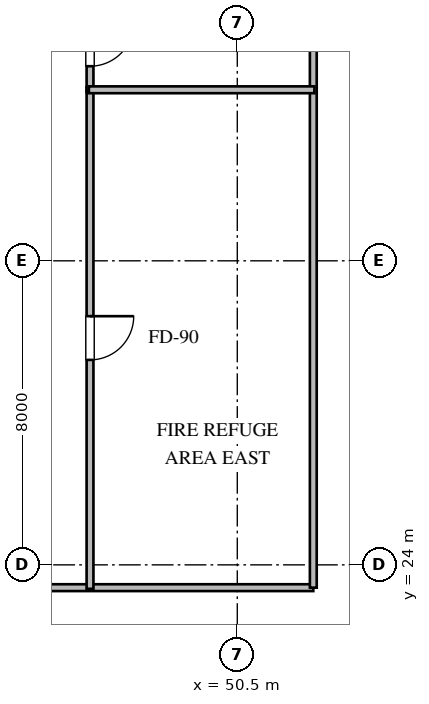
"""IFC4 building model, lengths in metres.
Left out: names, types, materials, properties, quantities, classifications, styles, units other than length and angle.
Written with IfcOpenShell. Run it as: python <this file> out.ifc"""

import sys

from ifc_helpers import new_model, si_unit, direction, frame, frame_2d, origin, place, context, subcontext, project, spatial, rectangle, extrude, element, fill, save


model = new_model("IFC4")
c1 = context("Model", 3, precision=1e-05, world=origin(), true_north=direction((0.0, 1.0)))
c2 = subcontext(c1, "Body", "Model", "MODEL_VIEW")
j1 = project(units=[si_unit("LENGTHUNIT", "METRE"), si_unit("PLANEANGLEUNIT", "RADIAN")], contexts=[c1])
p1 = place(None, origin())
s1 = spatial("IfcSite", under=j1, at=p1, CompositionType="ELEMENT")
p2 = place(p1, origin())
s2 = spatial("IfcBuilding", under=s1, at=p2, CompositionType="ELEMENT")
p3 = place(p2, frame((0.0, 0.0, 253.2)))
s3 = spatial("IfcBuildingStorey", under=s2, at=p3, CompositionType="ELEMENT", Elevation=253.2)
p4 = place(p3, frame((44.225, 23.4, 0.0), z_axis=(0.0, 0.0, 1.0), x_axis=(1.0, 0.0, 0.0)))
e1 = element("IfcWall", 1, at=p4, inside=s3, PredefinedType="PARTITIONING", context=c2, shape_type="SweptSolid", body=[
    extrude(rectangle(XDim=8.275, YDim=0.18, at=frame_2d((4.137, 0.0))), origin(), (0.0, 0.0, 1.0), 3.65),
])
p5 = place(p3, frame((52.5, 23.4, 0.0), z_axis=(0.0, 0.0, 1.0), x_axis=(0.0, 1.0, 0.0)))
e2 = element("IfcWall", 2, at=p5, inside=s3, PredefinedType="PARTITIONING", context=c2, shape_type="SweptSolid", body=[
    extrude(rectangle(XDim=19.8, YDim=0.18, at=frame_2d((9.9, 0.0))), origin(), (0.0, 0.0, 1.0), 5.16),
])
p6 = place(p3, frame((46.625, 36.565, 0.0), z_axis=(0.0, 0.0, 1.0), x_axis=(0.0, -1.0, 0.0)))
e3 = element("IfcWall", 3, at=p6, inside=s3, PredefinedType="PARTITIONING", context=c2, shape_type="SweptSolid", body=[
    extrude(rectangle(XDim=13.195, YDim=0.18, at=frame_2d((6.597, 0.0))), origin(), (0.0, 0.0, 1.0), 5.16),
])
p7 = place(p6, frame((6.022, 0.0, 0.0)))
e4 = element("IfcOpeningElement", 4, at=p7, cuts=e3, PredefinedType="OPENING", context=c2, shape_type="SweptSolid", body=[
    extrude(rectangle(XDim=1.15, YDim=2.1, at=frame_2d((0.575, 1.05))), frame((0.0, 0.1, 0.0), z_axis=(0.0, -1.0, 0.0), x_axis=(1.0, 0.0, 0.0)), (0.0, 0.0, 1.0), 0.2),
])
p8 = place(p3, frame((46.625, 38.955, 0.0), z_axis=(0.0, 0.0, 1.0), x_axis=(0.0, -1.0, 0.0)))
e5 = element("IfcWall", 5, at=p8, inside=s3, PredefinedType="PARTITIONING", context=c2, shape_type="SweptSolid", body=[
    extrude(rectangle(XDim=2.52, YDim=0.18, at=frame_2d((1.26, 0.0))), origin(), (0.0, 0.0, 1.0), 5.16),
])
p9 = place(p8, frame((0.685, 0.0, 0.0)))
e6 = element("IfcOpeningElement", 6, at=p9, cuts=e5, PredefinedType="OPENING", context=c2, shape_type="SweptSolid", body=[
    extrude(rectangle(XDim=1.15, YDim=2.1, at=frame_2d((0.575, 1.05))), frame((0.0, 0.1, 0.0), z_axis=(0.0, -1.0, 0.0), x_axis=(1.0, 0.0, 0.0)), (0.0, 0.0, 1.0), 0.2),
])
p10 = place(p3, frame((46.595, 36.5, 0.0), z_axis=(0.0, 0.0, 1.0), x_axis=(1.0, 0.0, 0.0)))
e7 = element("IfcWall", 7, at=p10, inside=s3, PredefinedType="PARTITIONING", context=c2, shape_type="SweptSolid", body=[
    extrude(rectangle(XDim=5.935, YDim=0.18, at=frame_2d((2.968, 0.0))), origin(), (0.0, 0.0, 1.0), 3.65),
])
p11 = place(p7, origin())
e8 = element("IfcDoor", 8, at=p11, inside=s3, OperationType="SINGLE_SWING_LEFT", PredefinedType="DOOR", context=c2, shape_type="SweptSolid", body=[
    extrude(rectangle(XDim=1.15, YDim=2.1, at=frame_2d((0.575, 1.05))), frame((0.0, 0.025, 0.0), z_axis=(0.0, -1.0, 0.0), x_axis=(1.0, 0.0, 0.0)), (0.0, 0.0, 1.0), 0.05),
])
fill(e4, e8)
p12 = place(p9, origin())
e9 = element("IfcDoor", 9, at=p12, inside=s3, OperationType="SINGLE_SWING_LEFT", PredefinedType="DOOR", context=c2, shape_type="SweptSolid", body=[
    extrude(rectangle(XDim=1.15, YDim=2.1, at=frame_2d((0.575, 1.05))), frame((0.0, 0.025, 0.0), z_axis=(0.0, -1.0, 0.0), x_axis=(1.0, 0.0, 0.0)), (0.0, 0.0, 1.0), 0.05),
])
fill(e6, e9)
save(model, sys.argv[1])
